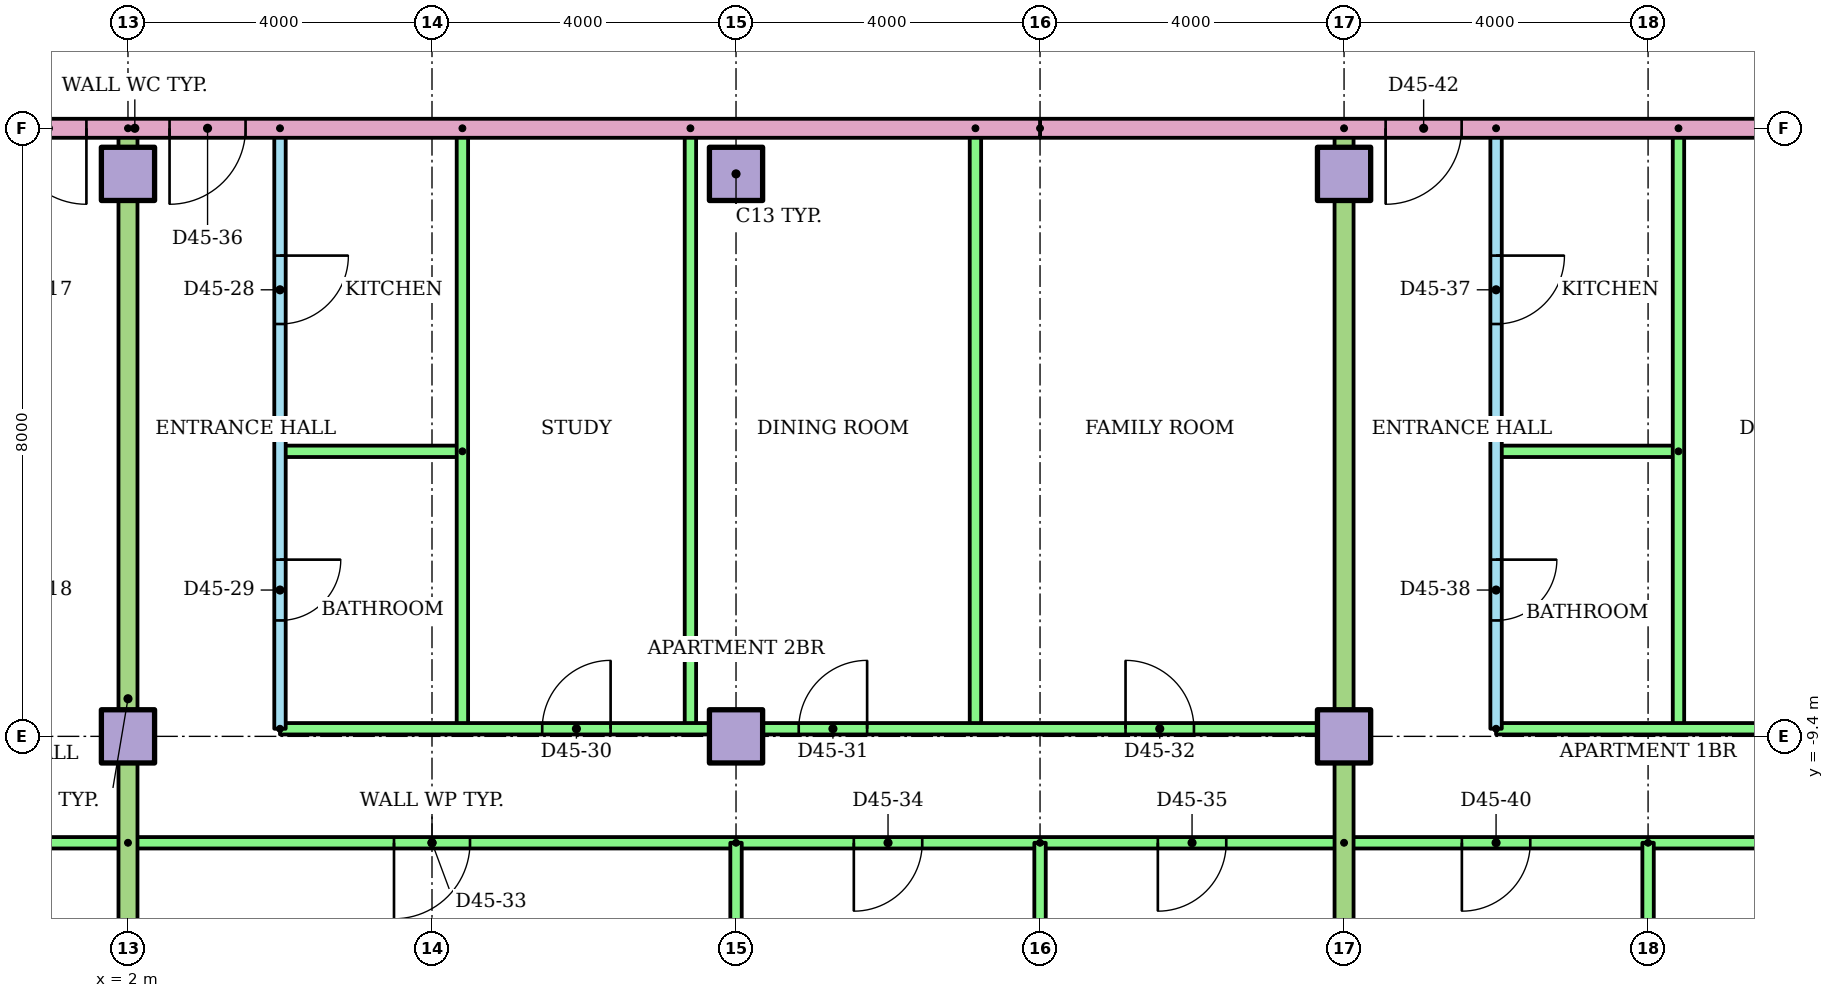
"""IFC4 building model, lengths in metres.
Left out: names, types, materials, properties, quantities, classifications, styles, units other than length and angle.
Written with IfcOpenShell. Run it as: python <this file> out.ifc"""

import sys

from ifc_helpers import new_model, si_unit, direction, frame, frame_2d, origin, origin_2d, place, context, subcontext, project, spatial, rectangle, extrude, element, fill, save


model = new_model("IFC4")
c1 = context("Model", 3, precision=1e-05, world=origin(), true_north=direction((0.0, 1.0)))
c2 = subcontext(c1, "Body", "Model", "MODEL_VIEW")
j1 = project(units=[si_unit("LENGTHUNIT", "METRE"), si_unit("PLANEANGLEUNIT", "RADIAN")], contexts=[c1])
p1 = place(None, origin())
s1 = spatial("IfcSite", under=j1, at=p1, CompositionType="ELEMENT")
p2 = place(p1, origin())
s2 = spatial("IfcBuilding", under=s1, at=p2, CompositionType="ELEMENT")
p3 = place(p2, frame((0.0, 0.0, 174.9)))
s3 = spatial("IfcBuildingStorey", under=s2, at=p3, CompositionType="ELEMENT", Elevation=174.9)
for number, where in (
    (1, (2.0, -9.4, 0.0)),
    (2, (10.0, -9.4, 0.0)),
    (3, (18.0, -9.4, 0.0)),
    (4, (2.0, -2.0, 0.0)),
    (5, (10.0, -2.0, 0.0)),
    (6, (18.0, -2.0, 0.0)),
):
    element("IfcColumn", number, at=place(p3, frame(where)), inside=s3, PredefinedType="COLUMN", context=c2, shape_type="SweptSolid", body=[
        extrude(rectangle(XDim=0.7, YDim=0.7, at=origin_2d()), origin(), (0.0, 0.0, 1.0), 3.2),
    ])
p4 = place(p3, frame((2.0, -10.8, 0.0), z_axis=(0.0, 0.0, 1.0), x_axis=(-1.0, 0.0, 0.0)))
e7 = element("IfcWall", 7, at=p4, inside=s3, PredefinedType="PARTITIONING", context=c2, shape_type="SweptSolid", body=[
    extrude(rectangle(XDim=26.82, YDim=0.15, at=frame_2d((13.41, 0.0))), origin(), (0.0, 0.0, 1.0), 2.4),
])
p5 = place(p4, frame((20.8, 0.0, 0.0)))
e8 = element("IfcOpeningElement", 8, at=p5, cuts=e7, PredefinedType="OPENING", context=c2, shape_type="SweptSolid", body=[
    extrude(rectangle(XDim=1.0, YDim=2.1, at=frame_2d((0.5, 1.05))), frame((0.0, 0.085, 0.0), z_axis=(0.0, -1.0, 0.0), x_axis=(1.0, 0.0, 0.0)), (0.0, 0.0, 1.0), 0.17),
])
p6 = place(p4, frame((13.55, 0.0, 0.0)))
e9 = element("IfcOpeningElement", 9, at=p6, cuts=e7, PredefinedType="OPENING", context=c2, shape_type="SweptSolid", body=[
    extrude(rectangle(XDim=0.9, YDim=2.1, at=frame_2d((0.45, 1.05))), frame((0.0, 0.085, 0.0), z_axis=(0.0, -1.0, 0.0), x_axis=(1.0, 0.0, 0.0)), (0.0, 0.0, 1.0), 0.17),
])
p7 = place(p4, frame((9.55, 0.0, 0.0)))
e10 = element("IfcOpeningElement", 10, at=p7, cuts=e7, PredefinedType="OPENING", context=c2, shape_type="SweptSolid", body=[
    extrude(rectangle(XDim=0.9, YDim=2.1, at=frame_2d((0.45, 1.05))), frame((0.0, 0.085, 0.0), z_axis=(0.0, -1.0, 0.0), x_axis=(1.0, 0.0, 0.0)), (0.0, 0.0, 1.0), 0.17),
])
p8 = place(p4, frame((5.55, 0.0, 0.0)))
e11 = element("IfcOpeningElement", 11, at=p8, cuts=e7, PredefinedType="OPENING", context=c2, shape_type="SweptSolid", body=[
    extrude(rectangle(XDim=0.9, YDim=2.1, at=frame_2d((0.45, 1.05))), frame((0.0, 0.085, 0.0), z_axis=(0.0, -1.0, 0.0), x_axis=(1.0, 0.0, 0.0)), (0.0, 0.0, 1.0), 0.17),
])
p9 = place(p4, frame((1.55, 0.0, 0.0)))
e12 = element("IfcOpeningElement", 12, at=p9, cuts=e7, PredefinedType="OPENING", context=c2, shape_type="SweptSolid", body=[
    extrude(rectangle(XDim=0.9, YDim=2.1, at=frame_2d((0.45, 1.05))), frame((0.0, 0.085, 0.0), z_axis=(0.0, -1.0, 0.0), x_axis=(1.0, 0.0, 0.0)), (0.0, 0.0, 1.0), 0.17),
])
p10 = place(p3, frame((4.0, -1.4, 0.0), z_axis=(0.0, 0.0, 1.0), x_axis=(0.0, -1.0, 0.0)))
e13 = element("IfcWall", 13, at=p10, inside=s3, PredefinedType="PARTITIONING", context=c2, shape_type="SweptSolid", body=[
    extrude(rectangle(XDim=7.9, YDim=0.15, at=frame_2d((3.95, 0.0))), origin(), (0.0, 0.0, 1.0), 2.4),
])
p11 = place(p10, frame((1.675, 0.0, 0.0)))
e14 = element("IfcOpeningElement", 14, at=p11, cuts=e13, PredefinedType="OPENING", context=c2, shape_type="SweptSolid", body=[
    extrude(rectangle(XDim=0.9, YDim=2.1, at=frame_2d((0.45, 1.05))), frame((0.0, 0.085, 0.0), z_axis=(0.0, -1.0, 0.0), x_axis=(1.0, 0.0, 0.0)), (0.0, 0.0, 1.0), 0.17),
])
p12 = place(p10, frame((5.675, 0.0, 0.0)))
e15 = element("IfcOpeningElement", 15, at=p12, cuts=e13, PredefinedType="OPENING", context=c2, shape_type="SweptSolid", body=[
    extrude(rectangle(XDim=0.8, YDim=2.1, at=frame_2d((0.4, 1.05))), frame((0.0, 0.085, 0.0), z_axis=(0.0, -1.0, 0.0), x_axis=(1.0, 0.0, 0.0)), (0.0, 0.0, 1.0), 0.17),
])
p13 = place(p3, frame((6.4, -5.65, 0.0), z_axis=(0.0, 0.0, 1.0), x_axis=(-1.0, 0.0, 0.0)))
e16 = element("IfcWall", 16, at=p13, inside=s3, PredefinedType="PARTITIONING", context=c2, shape_type="SweptSolid", body=[
    extrude(rectangle(XDim=2.4, YDim=0.15, at=frame_2d((1.2, 0.0))), origin(), (0.0, 0.0, 1.0), 2.4),
])
for number, where, z_axis, x_axis in (
    (17, (6.4, -1.4, 0.0), (0.0, 0.0, 1.0), (0.0, -1.0, 0.0)),
    (18, (9.4, -1.4, 0.0), (0.0, 0.0, 1.0), (0.0, -1.0, 0.0)),
    (19, (13.15, -1.4, 0.0), (0.0, 0.0, 1.0), (0.0, -1.0, 0.0)),
):
    element("IfcWall", number, at=place(p3, frame(where, z_axis=z_axis, x_axis=x_axis)), inside=s3, PredefinedType="PARTITIONING", context=c2, shape_type="SweptSolid", body=[
        extrude(rectangle(XDim=7.9, YDim=0.15, at=frame_2d((3.95, 0.0))), origin(), (0.0, 0.0, 1.0), 2.4),
    ])
p14 = place(p3, frame((4.0, -9.3, 0.0)))
e20 = element("IfcWall", 20, at=p14, inside=s3, PredefinedType="PARTITIONING", context=c2, shape_type="SweptSolid", body=[
    extrude(rectangle(XDim=14.0, YDim=0.15, at=frame_2d((7.0, 0.0))), origin(), (0.0, 0.0, 1.0), 2.4),
])
p15 = place(p14, frame((3.45, 0.0, 0.0)))
e21 = element("IfcOpeningElement", 21, at=p15, cuts=e20, PredefinedType="OPENING", context=c2, shape_type="SweptSolid", body=[
    extrude(rectangle(XDim=0.9, YDim=2.1, at=frame_2d((0.45, 1.05))), frame((0.0, 0.085, 0.0), z_axis=(0.0, -1.0, 0.0), x_axis=(1.0, 0.0, 0.0)), (0.0, 0.0, 1.0), 0.17),
])
p16 = place(p14, frame((6.825, 0.0, 0.0)))
e22 = element("IfcOpeningElement", 22, at=p16, cuts=e20, PredefinedType="OPENING", context=c2, shape_type="SweptSolid", body=[
    extrude(rectangle(XDim=0.9, YDim=2.1, at=frame_2d((0.45, 1.05))), frame((0.0, 0.085, 0.0), z_axis=(0.0, -1.0, 0.0), x_axis=(1.0, 0.0, 0.0)), (0.0, 0.0, 1.0), 0.17),
])
p17 = place(p14, frame((11.125, 0.0, 0.0)))
e23 = element("IfcOpeningElement", 23, at=p17, cuts=e20, PredefinedType="OPENING", context=c2, shape_type="SweptSolid", body=[
    extrude(rectangle(XDim=0.9, YDim=2.1, at=frame_2d((0.45, 1.05))), frame((0.0, 0.085, 0.0), z_axis=(0.0, -1.0, 0.0), x_axis=(1.0, 0.0, 0.0)), (0.0, 0.0, 1.0), 0.17),
])
p18 = place(p3, frame((18.0, -10.8, 0.0), z_axis=(0.0, 0.0, 1.0), x_axis=(-1.0, 0.0, 0.0)))
e24 = element("IfcWall", 24, at=p18, inside=s3, PredefinedType="PARTITIONING", context=c2, shape_type="SweptSolid", body=[
    extrude(rectangle(XDim=16.0, YDim=0.15, at=frame_2d((8.0, 0.0))), origin(), (0.0, 0.0, 1.0), 2.4),
])
p19 = place(p18, frame((11.5, 0.0, 0.0)))
e25 = element("IfcOpeningElement", 25, at=p19, cuts=e24, PredefinedType="OPENING", context=c2, shape_type="SweptSolid", body=[
    extrude(rectangle(XDim=1.0, YDim=2.1, at=frame_2d((0.5, 1.05))), frame((0.0, 0.085, 0.0), z_axis=(0.0, -1.0, 0.0), x_axis=(1.0, 0.0, 0.0)), (0.0, 0.0, 1.0), 0.17),
])
p20 = place(p18, frame((5.55, 0.0, 0.0)))
e26 = element("IfcOpeningElement", 26, at=p20, cuts=e24, PredefinedType="OPENING", context=c2, shape_type="SweptSolid", body=[
    extrude(rectangle(XDim=0.9, YDim=2.1, at=frame_2d((0.45, 1.05))), frame((0.0, 0.085, 0.0), z_axis=(0.0, -1.0, 0.0), x_axis=(1.0, 0.0, 0.0)), (0.0, 0.0, 1.0), 0.17),
])
p21 = place(p18, frame((1.55, 0.0, 0.0)))
e27 = element("IfcOpeningElement", 27, at=p21, cuts=e24, PredefinedType="OPENING", context=c2, shape_type="SweptSolid", body=[
    extrude(rectangle(XDim=0.9, YDim=2.1, at=frame_2d((0.45, 1.05))), frame((0.0, 0.085, 0.0), z_axis=(0.0, -1.0, 0.0), x_axis=(1.0, 0.0, 0.0)), (0.0, 0.0, 1.0), 0.17),
])
p22 = place(p3, frame((10.0, -10.8, 0.0), z_axis=(0.0, 0.0, 1.0), x_axis=(0.0, -1.0, 0.0)))
e28 = element("IfcWall", 28, at=p22, inside=s3, PredefinedType="PARTITIONING", context=c2, shape_type="SweptSolid", body=[
    extrude(rectangle(XDim=5.61, YDim=0.15, at=frame_2d((2.805, 0.0))), origin(), (0.0, 0.0, 1.0), 2.4),
])
p23 = place(p3, frame((14.0, -10.8, 0.0), z_axis=(0.0, 0.0, 1.0), x_axis=(0.0, -1.0, 0.0)))
e29 = element("IfcWall", 29, at=p23, inside=s3, PredefinedType="PARTITIONING", context=c2, shape_type="SweptSolid", body=[
    extrude(rectangle(XDim=5.621, YDim=0.15, at=frame_2d((2.811, 0.0))), origin(), (0.0, 0.0, 1.0), 2.4),
])
p24 = place(p3, frame((2.0, -1.4, 0.0), z_axis=(0.0, 0.0, 1.0), x_axis=(0.0, -1.0, 0.0)))
e30 = element("IfcWall", 30, at=p24, inside=s3, PredefinedType="PARTITIONING", context=c2, shape_type="SweptSolid", body=[
    extrude(rectangle(XDim=15.01, YDim=0.25, at=frame_2d((7.505, 0.0))), origin(), (0.0, 0.0, 1.0), 2.4),
])
p25 = place(p3, frame((20.0, -1.4, 0.0), z_axis=(0.0, 0.0, 1.0), x_axis=(0.0, -1.0, 0.0)))
e31 = element("IfcWall", 31, at=p25, inside=s3, PredefinedType="PARTITIONING", context=c2, shape_type="SweptSolid", body=[
    extrude(rectangle(XDim=7.9, YDim=0.15, at=frame_2d((3.95, 0.0))), origin(), (0.0, 0.0, 1.0), 2.4),
])
p26 = place(p25, frame((1.675, 0.0, 0.0)))
e32 = element("IfcOpeningElement", 32, at=p26, cuts=e31, PredefinedType="OPENING", context=c2, shape_type="SweptSolid", body=[
    extrude(rectangle(XDim=0.9, YDim=2.1, at=frame_2d((0.45, 1.05))), frame((0.0, 0.085, 0.0), z_axis=(0.0, -1.0, 0.0), x_axis=(1.0, 0.0, 0.0)), (0.0, 0.0, 1.0), 0.17),
])
p27 = place(p25, frame((5.675, 0.0, 0.0)))
e33 = element("IfcOpeningElement", 33, at=p27, cuts=e31, PredefinedType="OPENING", context=c2, shape_type="SweptSolid", body=[
    extrude(rectangle(XDim=0.8, YDim=2.1, at=frame_2d((0.4, 1.05))), frame((0.0, 0.085, 0.0), z_axis=(0.0, -1.0, 0.0), x_axis=(1.0, 0.0, 0.0)), (0.0, 0.0, 1.0), 0.17),
])
p28 = place(p3, frame((22.4, -5.65, 0.0), z_axis=(0.0, 0.0, 1.0), x_axis=(-1.0, 0.0, 0.0)))
e34 = element("IfcWall", 34, at=p28, inside=s3, PredefinedType="PARTITIONING", context=c2, shape_type="SweptSolid", body=[
    extrude(rectangle(XDim=2.4, YDim=0.15, at=frame_2d((1.2, 0.0))), origin(), (0.0, 0.0, 1.0), 2.4),
])
p29 = place(p3, frame((22.4, -1.4, 0.0), z_axis=(0.0, 0.0, 1.0), x_axis=(0.0, -1.0, 0.0)))
e35 = element("IfcWall", 35, at=p29, inside=s3, PredefinedType="PARTITIONING", context=c2, shape_type="SweptSolid", body=[
    extrude(rectangle(XDim=7.9, YDim=0.15, at=frame_2d((3.95, 0.0))), origin(), (0.0, 0.0, 1.0), 2.4),
])
p30 = place(p3, frame((20.0, -9.3, 0.0)))
e36 = element("IfcWall", 36, at=p30, inside=s3, PredefinedType="PARTITIONING", context=c2, shape_type="SweptSolid", body=[
    extrude(rectangle(XDim=6.0, YDim=0.15, at=frame_2d((3.0, 0.0))), origin(), (0.0, 0.0, 1.0), 2.4),
])
p31 = place(p30, frame((3.75, 0.0, 0.0)))
e37 = element("IfcOpeningElement", 37, at=p31, cuts=e36, PredefinedType="OPENING", context=c2, shape_type="SweptSolid", body=[
    extrude(rectangle(XDim=0.9, YDim=2.1, at=frame_2d((0.45, 1.05))), frame((0.0, 0.085, 0.0), z_axis=(0.0, -1.0, 0.0), x_axis=(1.0, 0.0, 0.0)), (0.0, 0.0, 1.0), 0.17),
])
p32 = place(p3, frame((26.0, -10.8, 0.0), z_axis=(0.0, 0.0, 1.0), x_axis=(-1.0, 0.0, 0.0)))
e38 = element("IfcWall", 38, at=p32, inside=s3, PredefinedType="PARTITIONING", context=c2, shape_type="SweptSolid", body=[
    extrude(rectangle(XDim=8.0, YDim=0.15, at=frame_2d((4.0, 0.0))), origin(), (0.0, 0.0, 1.0), 2.4),
])
p33 = place(p32, frame((5.55, 0.0, 0.0)))
e39 = element("IfcOpeningElement", 39, at=p33, cuts=e38, PredefinedType="OPENING", context=c2, shape_type="SweptSolid", body=[
    extrude(rectangle(XDim=0.9, YDim=2.1, at=frame_2d((0.45, 1.05))), frame((0.0, 0.085, 0.0), z_axis=(0.0, -1.0, 0.0), x_axis=(1.0, 0.0, 0.0)), (0.0, 0.0, 1.0), 0.17),
])
p34 = place(p32, frame((1.5, 0.0, 0.0)))
e40 = element("IfcOpeningElement", 40, at=p34, cuts=e38, PredefinedType="OPENING", context=c2, shape_type="SweptSolid", body=[
    extrude(rectangle(XDim=1.0, YDim=2.1, at=frame_2d((0.5, 1.05))), frame((0.0, 0.085, 0.0), z_axis=(0.0, -1.0, 0.0), x_axis=(1.0, 0.0, 0.0)), (0.0, 0.0, 1.0), 0.17),
])
p35 = place(p3, frame((22.0, -10.8, 0.0), z_axis=(0.0, 0.0, 1.0), x_axis=(0.0, -1.0, 0.0)))
e41 = element("IfcWall", 41, at=p35, inside=s3, PredefinedType="PARTITIONING", context=c2, shape_type="SweptSolid", body=[
    extrude(rectangle(XDim=5.621, YDim=0.15, at=frame_2d((2.811, 0.0))), origin(), (0.0, 0.0, 1.0), 2.4),
])
p36 = place(p3, frame((18.0, -1.4, 0.0), z_axis=(0.0, 0.0, 1.0), x_axis=(0.0, -1.0, 0.0)))
e42 = element("IfcWall", 42, at=p36, inside=s3, PredefinedType="PARTITIONING", context=c2, shape_type="SweptSolid", body=[
    extrude(rectangle(XDim=15.01, YDim=0.25, at=frame_2d((7.505, 0.0))), origin(), (0.0, 0.0, 1.0), 2.4),
])
p37 = place(p3, frame((29.0, -1.4, 0.0), z_axis=(0.0, 0.0, 1.0), x_axis=(-1.0, 0.0, 0.0)))
e43 = element("IfcWall", 43, at=p37, inside=s3, PredefinedType="PARTITIONING", context=c2, shape_type="SweptSolid", body=[
    extrude(rectangle(XDim=15.0, YDim=0.25, at=frame_2d((7.5, 0.0))), origin(), (0.0, 0.0, 1.0), 2.4),
])
p38 = place(p37, frame((9.453, 0.0, 0.0)))
e44 = element("IfcOpeningElement", 44, at=p38, cuts=e43, PredefinedType="OPENING", context=c2, shape_type="SweptSolid", body=[
    extrude(rectangle(XDim=1.0, YDim=2.1, at=frame_2d((0.5, 1.05))), frame((0.0, 0.135, 0.0), z_axis=(0.0, -1.0, 0.0), x_axis=(1.0, 0.0, 0.0)), (0.0, 0.0, 1.0), 0.27),
])
p39 = place(p37, frame((1.453, 0.0, 0.0)))
e45 = element("IfcOpeningElement", 45, at=p39, cuts=e43, PredefinedType="OPENING", context=c2, shape_type="SweptSolid", body=[
    extrude(rectangle(XDim=1.0, YDim=2.1, at=frame_2d((0.5, 1.05))), frame((0.0, 0.135, 0.0), z_axis=(0.0, -1.0, 0.0), x_axis=(1.0, 0.0, 0.0)), (0.0, 0.0, 1.0), 0.27),
])
p40 = place(p3, frame((14.0, -1.4, 0.0), z_axis=(0.0, 0.0, 1.0), x_axis=(-1.0, 0.0, 0.0)))
e46 = element("IfcWall", 46, at=p40, inside=s3, PredefinedType="PARTITIONING", context=c2, shape_type="SweptSolid", body=[
    extrude(rectangle(XDim=28.0, YDim=0.25, at=frame_2d((14.0, 0.0))), origin(), (0.0, 0.0, 1.0), 2.4),
])
p41 = place(p40, frame((12.547, 0.0, 0.0)))
e47 = element("IfcOpeningElement", 47, at=p41, cuts=e46, PredefinedType="OPENING", context=c2, shape_type="SweptSolid", body=[
    extrude(rectangle(XDim=1.0, YDim=2.1, at=frame_2d((0.5, 1.05))), frame((0.0, 0.135, 0.0), z_axis=(0.0, -1.0, 0.0), x_axis=(1.0, 0.0, 0.0)), (0.0, 0.0, 1.0), 0.27),
])
p42 = place(p40, frame((10.453, 0.0, 0.0)))
e48 = element("IfcOpeningElement", 48, at=p42, cuts=e46, PredefinedType="OPENING", context=c2, shape_type="SweptSolid", body=[
    extrude(rectangle(XDim=1.0, YDim=2.1, at=frame_2d((0.5, 1.05))), frame((0.0, 0.135, 0.0), z_axis=(0.0, -1.0, 0.0), x_axis=(1.0, 0.0, 0.0)), (0.0, 0.0, 1.0), 0.27),
])
p43 = place(p41, origin())
e49 = element("IfcDoor", 49, at=p43, inside=s3, OperationType="SINGLE_SWING_LEFT", PredefinedType="DOOR", context=c2, shape_type="SweptSolid", body=[
    extrude(rectangle(XDim=1.0, YDim=2.1, at=frame_2d((0.5, 1.05))), frame((0.0, 0.025, 0.0), z_axis=(0.0, -1.0, 0.0), x_axis=(1.0, 0.0, 0.0)), (0.0, 0.0, 1.0), 0.05),
])
fill(e47, e49)
p44 = place(p11, origin())
e50 = element("IfcDoor", 50, at=p44, inside=s3, OperationType="SINGLE_SWING_LEFT", PredefinedType="DOOR", context=c2, shape_type="SweptSolid", body=[
    extrude(rectangle(XDim=0.9, YDim=2.1, at=frame_2d((0.45, 1.05))), frame((0.0, 0.025, 0.0), z_axis=(0.0, -1.0, 0.0), x_axis=(1.0, 0.0, 0.0)), (0.0, 0.0, 1.0), 0.05),
])
fill(e14, e50)
p45 = place(p12, origin())
e51 = element("IfcDoor", 51, at=p45, inside=s3, OperationType="SINGLE_SWING_LEFT", PredefinedType="DOOR", context=c2, shape_type="SweptSolid", body=[
    extrude(rectangle(XDim=0.8, YDim=2.1, at=frame_2d((0.4, 1.05))), frame((0.0, 0.025, 0.0), z_axis=(0.0, -1.0, 0.0), x_axis=(1.0, 0.0, 0.0)), (0.0, 0.0, 1.0), 0.05),
])
fill(e15, e51)
p46 = place(p15, origin())
e52 = element("IfcDoor", 52, at=p46, inside=s3, OperationType="SINGLE_SWING_RIGHT", PredefinedType="DOOR", context=c2, shape_type="SweptSolid", body=[
    extrude(rectangle(XDim=0.9, YDim=2.1, at=frame_2d((0.45, 1.05))), frame((0.0, 0.025, 0.0), z_axis=(0.0, -1.0, 0.0), x_axis=(1.0, 0.0, 0.0)), (0.0, 0.0, 1.0), 0.05),
])
fill(e21, e52)
p47 = place(p16, origin())
e53 = element("IfcDoor", 53, at=p47, inside=s3, OperationType="SINGLE_SWING_RIGHT", PredefinedType="DOOR", context=c2, shape_type="SweptSolid", body=[
    extrude(rectangle(XDim=0.9, YDim=2.1, at=frame_2d((0.45, 1.05))), frame((0.0, 0.025, 0.0), z_axis=(0.0, -1.0, 0.0), x_axis=(1.0, 0.0, 0.0)), (0.0, 0.0, 1.0), 0.05),
])
fill(e22, e53)
p48 = place(p17, origin())
e54 = element("IfcDoor", 54, at=p48, inside=s3, OperationType="SINGLE_SWING_LEFT", PredefinedType="DOOR", context=c2, shape_type="SweptSolid", body=[
    extrude(rectangle(XDim=0.9, YDim=2.1, at=frame_2d((0.45, 1.05))), frame((0.0, 0.025, 0.0), z_axis=(0.0, -1.0, 0.0), x_axis=(1.0, 0.0, 0.0)), (0.0, 0.0, 1.0), 0.05),
])
fill(e23, e54)
p49 = place(p19, origin())
e55 = element("IfcDoor", 55, at=p49, inside=s3, OperationType="SINGLE_SWING_RIGHT", PredefinedType="DOOR", context=c2, shape_type="SweptSolid", body=[
    extrude(rectangle(XDim=1.0, YDim=2.1, at=frame_2d((0.5, 1.05))), frame((0.0, 0.025, 0.0), z_axis=(0.0, -1.0, 0.0), x_axis=(1.0, 0.0, 0.0)), (0.0, 0.0, 1.0), 0.05),
])
fill(e25, e55)
p50 = place(p20, origin())
e56 = element("IfcDoor", 56, at=p50, inside=s3, OperationType="SINGLE_SWING_RIGHT", PredefinedType="DOOR", context=c2, shape_type="SweptSolid", body=[
    extrude(rectangle(XDim=0.9, YDim=2.1, at=frame_2d((0.45, 1.05))), frame((0.0, 0.025, 0.0), z_axis=(0.0, -1.0, 0.0), x_axis=(1.0, 0.0, 0.0)), (0.0, 0.0, 1.0), 0.05),
])
fill(e26, e56)
p51 = place(p21, origin())
e57 = element("IfcDoor", 57, at=p51, inside=s3, OperationType="SINGLE_SWING_RIGHT", PredefinedType="DOOR", context=c2, shape_type="SweptSolid", body=[
    extrude(rectangle(XDim=0.9, YDim=2.1, at=frame_2d((0.45, 1.05))), frame((0.0, 0.025, 0.0), z_axis=(0.0, -1.0, 0.0), x_axis=(1.0, 0.0, 0.0)), (0.0, 0.0, 1.0), 0.05),
])
fill(e27, e57)
p52 = place(p42, origin())
e58 = element("IfcDoor", 58, at=p52, inside=s3, OperationType="SINGLE_SWING_RIGHT", PredefinedType="DOOR", context=c2, shape_type="SweptSolid", body=[
    extrude(rectangle(XDim=1.0, YDim=2.1, at=frame_2d((0.5, 1.05))), frame((0.0, 0.025, 0.0), z_axis=(0.0, -1.0, 0.0), x_axis=(1.0, 0.0, 0.0)), (0.0, 0.0, 1.0), 0.05),
])
fill(e48, e58)
p53 = place(p26, origin())
e59 = element("IfcDoor", 59, at=p53, inside=s3, OperationType="SINGLE_SWING_LEFT", PredefinedType="DOOR", context=c2, shape_type="SweptSolid", body=[
    extrude(rectangle(XDim=0.9, YDim=2.1, at=frame_2d((0.45, 1.05))), frame((0.0, 0.025, 0.0), z_axis=(0.0, -1.0, 0.0), x_axis=(1.0, 0.0, 0.0)), (0.0, 0.0, 1.0), 0.05),
])
fill(e32, e59)
p54 = place(p27, origin())
e60 = element("IfcDoor", 60, at=p54, inside=s3, OperationType="SINGLE_SWING_LEFT", PredefinedType="DOOR", context=c2, shape_type="SweptSolid", body=[
    extrude(rectangle(XDim=0.8, YDim=2.1, at=frame_2d((0.4, 1.05))), frame((0.0, 0.025, 0.0), z_axis=(0.0, -1.0, 0.0), x_axis=(1.0, 0.0, 0.0)), (0.0, 0.0, 1.0), 0.05),
])
fill(e33, e60)
p55 = place(p33, origin())
e61 = element("IfcDoor", 61, at=p55, inside=s3, OperationType="SINGLE_SWING_RIGHT", PredefinedType="DOOR", context=c2, shape_type="SweptSolid", body=[
    extrude(rectangle(XDim=0.9, YDim=2.1, at=frame_2d((0.45, 1.05))), frame((0.0, 0.025, 0.0), z_axis=(0.0, -1.0, 0.0), x_axis=(1.0, 0.0, 0.0)), (0.0, 0.0, 1.0), 0.05),
])
fill(e39, e61)
p56 = place(p38, origin())
e62 = element("IfcDoor", 62, at=p56, inside=s3, OperationType="SINGLE_SWING_RIGHT", PredefinedType="DOOR", context=c2, shape_type="SweptSolid", body=[
    extrude(rectangle(XDim=1.0, YDim=2.1, at=frame_2d((0.5, 1.05))), frame((0.0, 0.025, 0.0), z_axis=(0.0, -1.0, 0.0), x_axis=(1.0, 0.0, 0.0)), (0.0, 0.0, 1.0), 0.05),
])
fill(e44, e62)
save(model, sys.argv[1])
